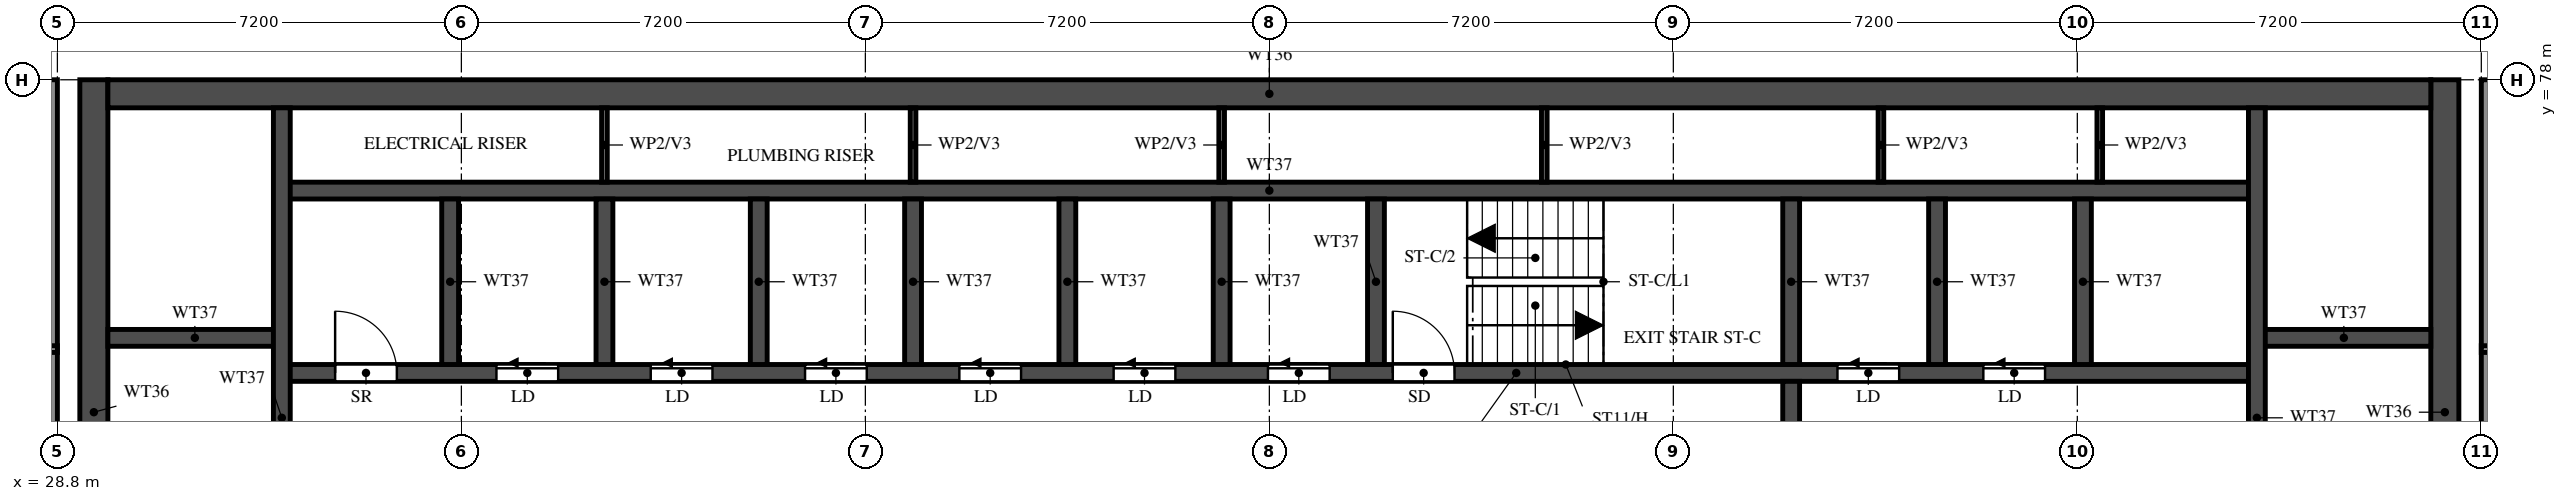
"""IFC4 building model, lengths in metres.
Left out: names, types, materials, properties, quantities, classifications, styles, units other than length and angle.
Written with IfcOpenShell. Run it as: python <this file> out.ifc"""

import sys

from ifc_helpers import new_model, si_unit, direction, frame, frame_2d, origin, place, context, subcontext, project, spatial, rectangle, extrude, element, fill, save


model = new_model("IFC4")
c1 = context("Model", 3, precision=1e-05, world=origin(), true_north=direction((0.0, 1.0)))
c2 = subcontext(c1, "Body", "Model", "MODEL_VIEW")
j1 = project(units=[si_unit("LENGTHUNIT", "METRE"), si_unit("PLANEANGLEUNIT", "RADIAN")], contexts=[c1])
p1 = place(None, origin())
s1 = spatial("IfcSite", under=j1, at=p1, CompositionType="ELEMENT")
p2 = place(p1, origin())
s2 = spatial("IfcBuilding", under=s1, at=p2, CompositionType="ELEMENT")
p3 = place(p2, frame((0.0, 0.0, 229.0)))
s3 = spatial("IfcBuildingStorey", under=s2, at=p3, CompositionType="ELEMENT", Elevation=229.0)
for number, where, z_axis, x_axis in (
    (1, (29.45, 66.15, 0.0), (0.0, 0.0, 1.0), (0.0, 1.0, 0.0)),
    (2, (71.35, 66.15, 0.0), (0.0, 0.0, 1.0), (0.0, 1.0, 0.0)),
):
    element("IfcWall", number, at=place(p3, frame(where, z_axis=z_axis, x_axis=x_axis)), inside=s3, PredefinedType="SHEAR", context=c2, shape_type="SweptSolid", body=[
        extrude(rectangle(XDim=11.85, YDim=0.5, at=frame_2d((5.925, 0.0))), origin(), (0.0, 0.0, 1.0), 3.22),
    ])
p4 = place(p3, frame((29.7, 77.75, 0.0), z_axis=(0.0, 0.0, 1.0), x_axis=(1.0, 0.0, 0.0)))
e3 = element("IfcWall", 3, at=p4, inside=s3, PredefinedType="SHEAR", context=c2, shape_type="SweptSolid", body=[
    extrude(rectangle(XDim=41.4, YDim=0.5, at=frame_2d((20.7, 0.0))), origin(), (0.0, 0.0, 1.0), 3.22),
])
p5 = place(p3, frame((32.8, 72.775, 0.0), z_axis=(0.0, 0.0, 1.0), x_axis=(1.0, 0.0, 0.0)))
e4 = element("IfcWall", 4, at=p5, inside=s3, PredefinedType="SHEAR", context=c2, shape_type="SweptSolid", body=[
    extrude(rectangle(XDim=35.2, YDim=0.3, at=frame_2d((17.6, 0.0))), origin(), (0.0, 0.0, 1.0), 3.22),
])
p6 = place(p5, frame((19.8, 0.0, 0.0)))
e5 = element("IfcOpeningElement", 5, at=p6, cuts=e4, PredefinedType="OPENING", context=c2, shape_type="SweptSolid", body=[
    extrude(rectangle(XDim=1.1, YDim=2.1, at=frame_2d((0.55, 1.05))), frame((0.0, 0.16, 0.0), z_axis=(0.0, -1.0, 0.0), x_axis=(1.0, 0.0, 0.0)), (0.0, 0.0, 1.0), 0.32),
])
p7 = place(p5, frame((27.725, 0.0, 0.0)))
e6 = element("IfcOpeningElement", 6, at=p7, cuts=e4, PredefinedType="OPENING", context=c2, shape_type="SweptSolid", body=[
    extrude(rectangle(XDim=1.1, YDim=2.1, at=frame_2d((0.55, 1.05))), frame((0.0, 0.16, 0.0), z_axis=(0.0, -1.0, 0.0), x_axis=(1.0, 0.0, 0.0)), (0.0, 0.0, 1.0), 0.32),
])
p8 = place(p5, frame((30.325, 0.0, 0.0)))
e7 = element("IfcOpeningElement", 7, at=p8, cuts=e4, PredefinedType="OPENING", context=c2, shape_type="SweptSolid", body=[
    extrude(rectangle(XDim=1.1, YDim=2.1, at=frame_2d((0.55, 1.05))), frame((0.0, 0.16, 0.0), z_axis=(0.0, -1.0, 0.0), x_axis=(1.0, 0.0, 0.0)), (0.0, 0.0, 1.0), 0.32),
])
p9 = place(p5, frame((3.825, 0.0, 0.0)))
e8 = element("IfcOpeningElement", 8, at=p9, cuts=e4, PredefinedType="OPENING", context=c2, shape_type="SweptSolid", body=[
    extrude(rectangle(XDim=1.1, YDim=2.1, at=frame_2d((0.55, 1.05))), frame((0.0, 0.16, 0.0), z_axis=(0.0, -1.0, 0.0), x_axis=(1.0, 0.0, 0.0)), (0.0, 0.0, 1.0), 0.32),
])
p10 = place(p5, frame((6.575, 0.0, 0.0)))
e9 = element("IfcOpeningElement", 9, at=p10, cuts=e4, PredefinedType="OPENING", context=c2, shape_type="SweptSolid", body=[
    extrude(rectangle(XDim=1.1, YDim=2.1, at=frame_2d((0.55, 1.05))), frame((0.0, 0.16, 0.0), z_axis=(0.0, -1.0, 0.0), x_axis=(1.0, 0.0, 0.0)), (0.0, 0.0, 1.0), 0.32),
])
p11 = place(p5, frame((9.325, 0.0, 0.0)))
e10 = element("IfcOpeningElement", 10, at=p11, cuts=e4, PredefinedType="OPENING", context=c2, shape_type="SweptSolid", body=[
    extrude(rectangle(XDim=1.1, YDim=2.1, at=frame_2d((0.55, 1.05))), frame((0.0, 0.16, 0.0), z_axis=(0.0, -1.0, 0.0), x_axis=(1.0, 0.0, 0.0)), (0.0, 0.0, 1.0), 0.32),
])
p12 = place(p5, frame((12.075, 0.0, 0.0)))
e11 = element("IfcOpeningElement", 11, at=p12, cuts=e4, PredefinedType="OPENING", context=c2, shape_type="SweptSolid", body=[
    extrude(rectangle(XDim=1.1, YDim=2.1, at=frame_2d((0.55, 1.05))), frame((0.0, 0.16, 0.0), z_axis=(0.0, -1.0, 0.0), x_axis=(1.0, 0.0, 0.0)), (0.0, 0.0, 1.0), 0.32),
])
p13 = place(p5, frame((14.825, 0.0, 0.0)))
e12 = element("IfcOpeningElement", 12, at=p13, cuts=e4, PredefinedType="OPENING", context=c2, shape_type="SweptSolid", body=[
    extrude(rectangle(XDim=1.1, YDim=2.1, at=frame_2d((0.55, 1.05))), frame((0.0, 0.16, 0.0), z_axis=(0.0, -1.0, 0.0), x_axis=(1.0, 0.0, 0.0)), (0.0, 0.0, 1.0), 0.32),
])
p14 = place(p5, frame((17.575, 0.0, 0.0)))
e13 = element("IfcOpeningElement", 13, at=p14, cuts=e4, PredefinedType="OPENING", context=c2, shape_type="SweptSolid", body=[
    extrude(rectangle(XDim=1.1, YDim=2.1, at=frame_2d((0.55, 1.05))), frame((0.0, 0.16, 0.0), z_axis=(0.0, -1.0, 0.0), x_axis=(1.0, 0.0, 0.0)), (0.0, 0.0, 1.0), 0.32),
])
p15 = place(p5, frame((0.95, 0.0, 0.0)))
e14 = element("IfcOpeningElement", 14, at=p15, cuts=e4, PredefinedType="OPENING", context=c2, shape_type="SweptSolid", body=[
    extrude(rectangle(XDim=1.1, YDim=2.1, at=frame_2d((0.55, 1.05))), frame((0.0, 0.16, 0.0), z_axis=(0.0, -1.0, 0.0), x_axis=(1.0, 0.0, 0.0)), (0.0, 0.0, 1.0), 0.32),
])
p16 = place(p3, frame((32.8, 76.025, 0.0), z_axis=(0.0, 0.0, 1.0), x_axis=(1.0, 0.0, 0.0)))
e15 = element("IfcWall", 15, at=p16, inside=s3, PredefinedType="SHEAR", context=c2, shape_type="SweptSolid", body=[
    extrude(rectangle(XDim=35.2, YDim=0.3, at=frame_2d((17.6, 0.0))), origin(), (0.0, 0.0, 1.0), 3.22),
])
for number, where, z_axis, x_axis in (
    (16, (29.7, 73.4, 0.0), (0.0, 0.0, 1.0), (1.0, 0.0, 0.0)),
    (17, (68.0, 73.4, 0.0), (0.0, 0.0, 1.0), (1.0, 0.0, 0.0)),
):
    element("IfcWall", number, at=place(p3, frame(where, z_axis=z_axis, x_axis=x_axis)), inside=s3, PredefinedType="SHEAR", context=c2, shape_type="SweptSolid", body=[
        extrude(rectangle(XDim=3.1, YDim=0.3, at=frame_2d((1.55, 0.0))), origin(), (0.0, 0.0, 1.0), 3.22),
    ])
p17 = place(p3, frame((32.8, 66.45, 0.0), z_axis=(0.0, 0.0, 1.0), x_axis=(0.0, 1.0, 0.0)))
e18 = element("IfcWall", 18, at=p17, inside=s3, PredefinedType="SHEAR", context=c2, shape_type="SweptSolid", body=[
    extrude(rectangle(XDim=11.05, YDim=0.3, at=frame_2d((5.525, 0.0))), origin(), (0.0, 0.0, 1.0), 3.22),
])
p18 = place(p3, frame((68.0, 66.45, 0.0), z_axis=(0.0, 0.0, 1.0), x_axis=(0.0, 1.0, 0.0)))
e19 = element("IfcWall", 19, at=p18, inside=s3, PredefinedType="SHEAR", context=c2, shape_type="SweptSolid", body=[
    extrude(rectangle(XDim=11.05, YDim=0.3, at=frame_2d((5.525, 0.0))), origin(), (0.0, 0.0, 1.0), 3.22),
])
p19 = place(p18, frame((0.15, 0.0, 0.0)))
e20 = element("IfcOpeningElement", 20, at=p19, cuts=e19, PredefinedType="OPENING", context=c2, shape_type="SweptSolid", body=[
    extrude(rectangle(XDim=1.1, YDim=2.1, at=frame_2d((0.55, 1.05))), frame((0.0, 0.16, 0.0), z_axis=(0.0, -1.0, 0.0), x_axis=(1.0, 0.0, 0.0)), (0.0, 0.0, 1.0), 0.32),
])
p20 = place(p3, frame((59.7, 66.45, 0.0), z_axis=(0.0, 0.0, 1.0), x_axis=(0.0, 1.0, 0.0)))
e21 = element("IfcWall", 21, at=p20, inside=s3, PredefinedType="SHEAR", context=c2, shape_type="SweptSolid", body=[
    extrude(rectangle(XDim=6.175, YDim=0.3, at=frame_2d((3.087, 0.0))), origin(), (0.0, 0.0, 1.0), 3.22),
])
p21 = place(p20, frame((3.85, 0.0, 0.0)))
e22 = element("IfcOpeningElement", 22, at=p21, cuts=e21, PredefinedType="OPENING", context=c2, shape_type="SweptSolid", body=[
    extrude(rectangle(XDim=1.2, YDim=2.1, at=frame_2d((0.6, 1.05))), frame((0.0, 0.16, 0.0), z_axis=(0.0, -1.0, 0.0), x_axis=(1.0, 0.0, 0.0)), (0.0, 0.0, 1.0), 0.32),
])
for number, where, z_axis, x_axis in (
    (23, (59.7, 72.925, 0.0), (0.0, 0.0, 1.0), (0.0, 1.0, 0.0)),
    (24, (35.8, 72.925, 0.0), (0.0, 0.0, 1.0), (0.0, 1.0, 0.0)),
    (25, (38.55, 72.925, 0.0), (0.0, 0.0, 1.0), (0.0, 1.0, 0.0)),
    (26, (41.3, 72.925, 0.0), (0.0, 0.0, 1.0), (0.0, 1.0, 0.0)),
    (27, (44.05, 72.925, 0.0), (0.0, 0.0, 1.0), (0.0, 1.0, 0.0)),
    (28, (46.8, 72.925, 0.0), (0.0, 0.0, 1.0), (0.0, 1.0, 0.0)),
    (29, (49.55, 72.925, 0.0), (0.0, 0.0, 1.0), (0.0, 1.0, 0.0)),
    (30, (52.3, 72.925, 0.0), (0.0, 0.0, 1.0), (0.0, 1.0, 0.0)),
    (31, (62.3, 72.925, 0.0), (0.0, 0.0, 1.0), (0.0, 1.0, 0.0)),
    (32, (64.9, 72.925, 0.0), (0.0, 0.0, 1.0), (0.0, 1.0, 0.0)),
):
    element("IfcWall", number, at=place(p3, frame(where, z_axis=z_axis, x_axis=x_axis)), inside=s3, PredefinedType="SHEAR", context=c2, shape_type="SweptSolid", body=[
        extrude(rectangle(XDim=2.95, YDim=0.3, at=frame_2d((1.475, 0.0))), origin(), (0.0, 0.0, 1.0), 3.22),
    ])
for number, where, z_axis, x_axis in (
    (33, (38.55, 76.175, 0.0), (0.0, 0.0, 1.0), (0.0, 1.0, 0.0)),
    (34, (44.05, 76.175, 0.0), (0.0, 0.0, 1.0), (0.0, 1.0, 0.0)),
    (35, (49.55, 76.175, 0.0), (0.0, 0.0, 1.0), (0.0, 1.0, 0.0)),
    (36, (55.3, 76.175, 0.0), (0.0, 0.0, 1.0), (0.0, 1.0, 0.0)),
    (37, (61.3, 76.175, 0.0), (0.0, 0.0, 1.0), (0.0, 1.0, 0.0)),
    (38, (65.2, 76.175, 0.0), (0.0, 0.0, 1.0), (0.0, 1.0, 0.0)),
):
    element("IfcWall", number, at=place(p3, frame(where, z_axis=z_axis, x_axis=x_axis)), inside=s3, PredefinedType="PARTITIONING", context=c2, shape_type="SweptSolid", body=[
        extrude(rectangle(XDim=1.325, YDim=0.1, at=frame_2d((0.663, 0.0))), origin(), (0.0, 0.0, 1.0), 3.22),
    ])
for number, where, z_axis, x_axis in (
    (39, (28.7, 62.4, 0.0), (0.0, 0.0, 1.0), (0.0, 1.0, 0.0)),
    (40, (72.1, 62.4, 0.0), (0.0, 0.0, 1.0), (0.0, 1.0, 0.0)),
):
    element("IfcWall", number, at=place(p3, frame(where, z_axis=z_axis, x_axis=x_axis)), inside=s3, PredefinedType="SOLIDWALL", context=c2, shape_type="SweptSolid", body=[
        extrude(rectangle(XDim=15.6, YDim=0.2, at=frame_2d((7.8, 0.0))), origin(), (0.0, 0.0, 1.0), 3.22),
    ])
p22 = place(p3, frame((18.525, 73.2, 0.0), z_axis=(0.0, 0.0, 1.0), x_axis=(1.0, 0.0, 0.0)))
e41 = element("IfcWall", 41, at=p22, inside=s3, PredefinedType="PARTITIONING", context=c2, shape_type="SweptSolid", body=[
    extrude(rectangle(XDim=10.275, YDim=0.12, at=frame_2d((5.138, 0.0))), origin(), (0.0, 0.0, 1.0), 2.32),
])
p23 = place(p22, frame((5.275, 0.0, 0.0)))
e42 = element("IfcOpeningElement", 42, at=p23, cuts=e41, PredefinedType="OPENING", context=c2, shape_type="SweptSolid", body=[
    extrude(rectangle(XDim=0.9, YDim=2.1, at=frame_2d((0.45, 1.05))), frame((0.0, 0.07, 0.0), z_axis=(0.0, -1.0, 0.0), x_axis=(1.0, 0.0, 0.0)), (0.0, 0.0, 1.0), 0.14),
])
p24 = place(p3, frame((72.0, 73.2, 0.0), z_axis=(0.0, 0.0, 1.0), x_axis=(1.0, 0.0, 0.0)))
e43 = element("IfcWall", 43, at=p24, inside=s3, PredefinedType="PARTITIONING", context=c2, shape_type="SweptSolid", body=[
    extrude(rectangle(XDim=10.275, YDim=0.12, at=frame_2d((5.137, 0.0))), origin(), (0.0, 0.0, 1.0), 2.32),
])
p25 = place(p24, frame((4.1, 0.0, 0.0)))
e44 = element("IfcOpeningElement", 44, at=p25, cuts=e43, PredefinedType="OPENING", context=c2, shape_type="SweptSolid", body=[
    extrude(rectangle(XDim=0.9, YDim=2.1, at=frame_2d((0.45, 1.05))), frame((0.0, 0.07, 0.0), z_axis=(0.0, -1.0, 0.0), x_axis=(1.0, 0.0, 0.0)), (0.0, 0.0, 1.0), 0.14),
])
p26 = place(p6, origin())
e45 = element("IfcDoor", 45, at=p26, inside=s3, OperationType="SINGLE_SWING_LEFT", PredefinedType="DOOR", context=c2, shape_type="SweptSolid", body=[
    extrude(rectangle(XDim=1.1, YDim=2.1, at=frame_2d((0.55, 1.05))), frame((0.0, 0.025, 0.0), z_axis=(0.0, -1.0, 0.0), x_axis=(1.0, 0.0, 0.0)), (0.0, 0.0, 1.0), 0.05),
])
fill(e5, e45)
p27 = place(p7, origin())
e46 = element("IfcDoor", 46, at=p27, inside=s3, OperationType="SLIDING_TO_LEFT", PredefinedType="DOOR", context=c2, shape_type="SweptSolid", body=[
    extrude(rectangle(XDim=1.1, YDim=2.1, at=frame_2d((0.55, 1.05))), frame((0.0, 0.025, 0.0), z_axis=(0.0, -1.0, 0.0), x_axis=(1.0, 0.0, 0.0)), (0.0, 0.0, 1.0), 0.05),
])
fill(e6, e46)
p28 = place(p8, origin())
e47 = element("IfcDoor", 47, at=p28, inside=s3, OperationType="SLIDING_TO_LEFT", PredefinedType="DOOR", context=c2, shape_type="SweptSolid", body=[
    extrude(rectangle(XDim=1.1, YDim=2.1, at=frame_2d((0.55, 1.05))), frame((0.0, 0.025, 0.0), z_axis=(0.0, -1.0, 0.0), x_axis=(1.0, 0.0, 0.0)), (0.0, 0.0, 1.0), 0.05),
])
fill(e7, e47)
p29 = place(p9, origin())
e48 = element("IfcDoor", 48, at=p29, inside=s3, OperationType="SLIDING_TO_LEFT", PredefinedType="DOOR", context=c2, shape_type="SweptSolid", body=[
    extrude(rectangle(XDim=1.1, YDim=2.1, at=frame_2d((0.55, 1.05))), frame((0.0, 0.025, 0.0), z_axis=(0.0, -1.0, 0.0), x_axis=(1.0, 0.0, 0.0)), (0.0, 0.0, 1.0), 0.05),
])
fill(e8, e48)
p30 = place(p10, origin())
e49 = element("IfcDoor", 49, at=p30, inside=s3, OperationType="SLIDING_TO_LEFT", PredefinedType="DOOR", context=c2, shape_type="SweptSolid", body=[
    extrude(rectangle(XDim=1.1, YDim=2.1, at=frame_2d((0.55, 1.05))), frame((0.0, 0.025, 0.0), z_axis=(0.0, -1.0, 0.0), x_axis=(1.0, 0.0, 0.0)), (0.0, 0.0, 1.0), 0.05),
])
fill(e9, e49)
p31 = place(p11, origin())
e50 = element("IfcDoor", 50, at=p31, inside=s3, OperationType="SLIDING_TO_LEFT", PredefinedType="DOOR", context=c2, shape_type="SweptSolid", body=[
    extrude(rectangle(XDim=1.1, YDim=2.1, at=frame_2d((0.55, 1.05))), frame((0.0, 0.025, 0.0), z_axis=(0.0, -1.0, 0.0), x_axis=(1.0, 0.0, 0.0)), (0.0, 0.0, 1.0), 0.05),
])
fill(e10, e50)
p32 = place(p12, origin())
e51 = element("IfcDoor", 51, at=p32, inside=s3, OperationType="SLIDING_TO_LEFT", PredefinedType="DOOR", context=c2, shape_type="SweptSolid", body=[
    extrude(rectangle(XDim=1.1, YDim=2.1, at=frame_2d((0.55, 1.05))), frame((0.0, 0.025, 0.0), z_axis=(0.0, -1.0, 0.0), x_axis=(1.0, 0.0, 0.0)), (0.0, 0.0, 1.0), 0.05),
])
fill(e11, e51)
p33 = place(p13, origin())
e52 = element("IfcDoor", 52, at=p33, inside=s3, OperationType="SLIDING_TO_LEFT", PredefinedType="DOOR", context=c2, shape_type="SweptSolid", body=[
    extrude(rectangle(XDim=1.1, YDim=2.1, at=frame_2d((0.55, 1.05))), frame((0.0, 0.025, 0.0), z_axis=(0.0, -1.0, 0.0), x_axis=(1.0, 0.0, 0.0)), (0.0, 0.0, 1.0), 0.05),
])
fill(e12, e52)
p34 = place(p14, origin())
e53 = element("IfcDoor", 53, at=p34, inside=s3, OperationType="SLIDING_TO_LEFT", PredefinedType="DOOR", context=c2, shape_type="SweptSolid", body=[
    extrude(rectangle(XDim=1.1, YDim=2.1, at=frame_2d((0.55, 1.05))), frame((0.0, 0.025, 0.0), z_axis=(0.0, -1.0, 0.0), x_axis=(1.0, 0.0, 0.0)), (0.0, 0.0, 1.0), 0.05),
])
fill(e13, e53)
p35 = place(p15, origin())
e54 = element("IfcDoor", 54, at=p35, inside=s3, OperationType="SINGLE_SWING_LEFT", PredefinedType="DOOR", context=c2, shape_type="SweptSolid", body=[
    extrude(rectangle(XDim=1.1, YDim=2.1, at=frame_2d((0.55, 1.05))), frame((0.0, 0.025, 0.0), z_axis=(0.0, -1.0, 0.0), x_axis=(1.0, 0.0, 0.0)), (0.0, 0.0, 1.0), 0.05),
])
fill(e14, e54)
save(model, sys.argv[1])
